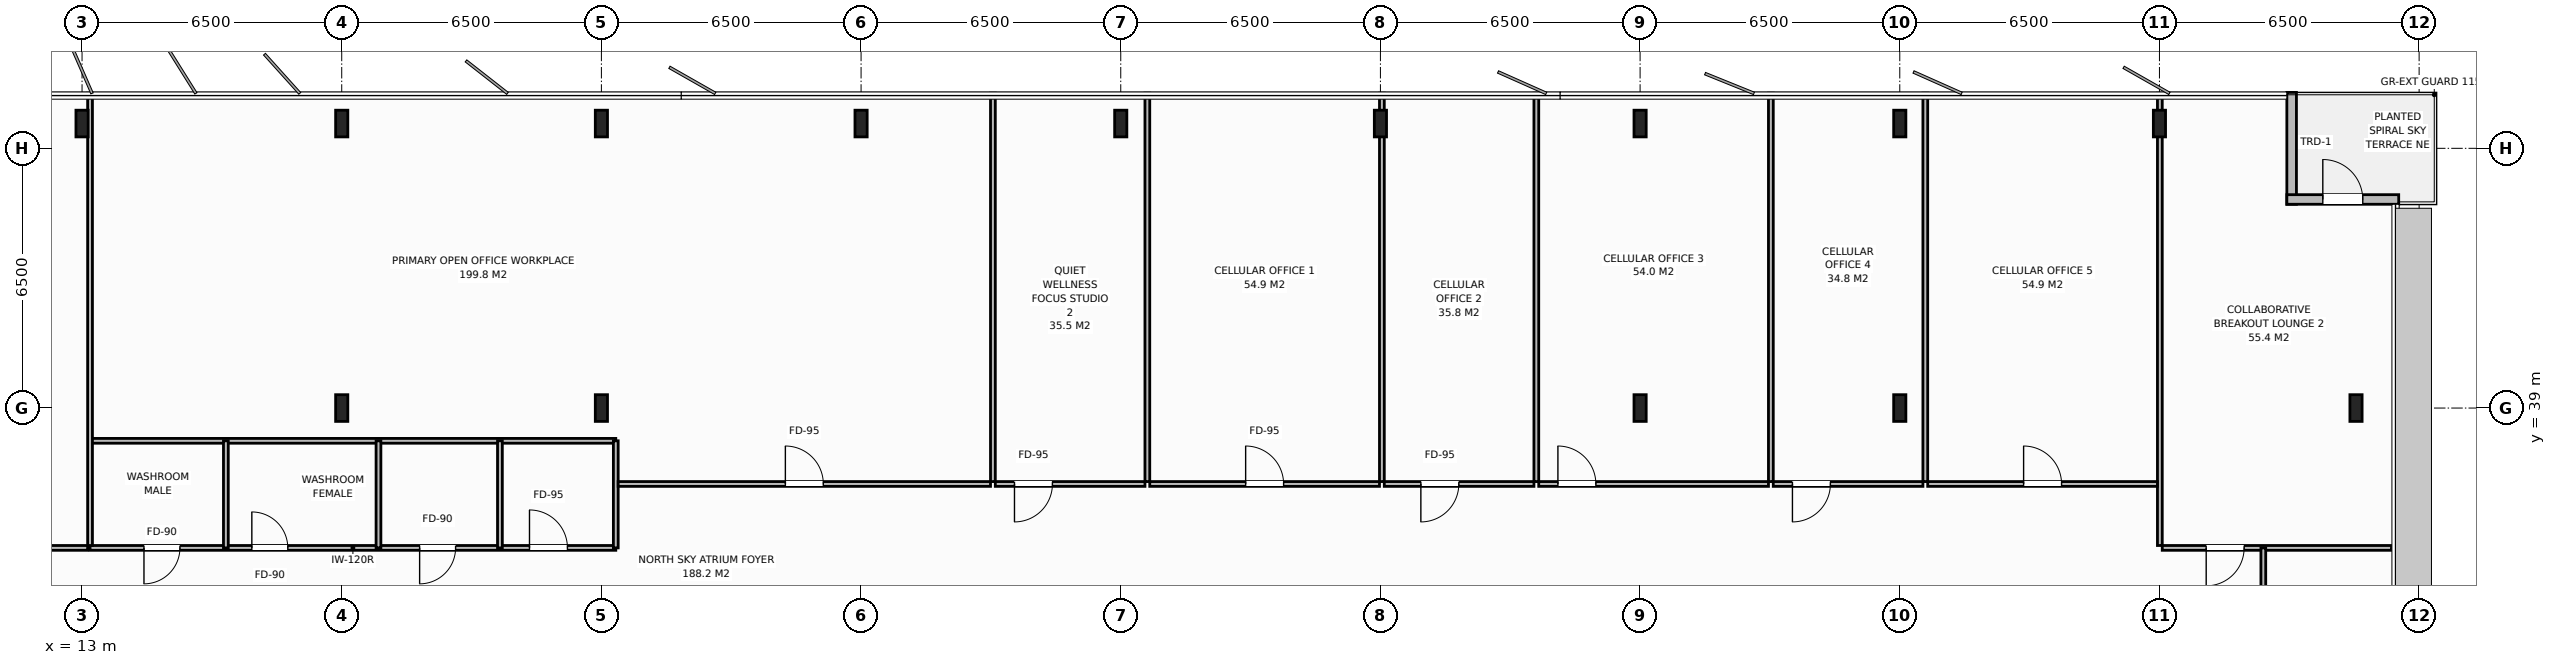
"""IFC4 building model, lengths in metres.
Left out: names, types, materials, properties, quantities, classifications, styles, units other than length and angle.
Written with IfcOpenShell. Run it as: python <this file> out.ifc"""

import sys

from ifc_helpers import new_model, si_unit, direction, frame, frame_2d, origin, origin_2d, place, context, subcontext, project, spatial, rectangle, i_section, extrude, element, fill, save


model = new_model("IFC4")
c1 = context("Model", 3, precision=1e-05, world=origin(), true_north=direction((0.0, 1.0)))
c2 = subcontext(c1, "Body", "Model", "MODEL_VIEW")
j1 = project(units=[si_unit("LENGTHUNIT", "METRE"), si_unit("PLANEANGLEUNIT", "RADIAN")], contexts=[c1])
p1 = place(None, origin())
s1 = spatial("IfcSite", under=j1, at=p1, CompositionType="ELEMENT")
p2 = place(p1, origin())
s2 = spatial("IfcBuilding", under=s1, at=p2, CompositionType="ELEMENT")
p3 = place(p2, frame((0.0, 0.0, 263.2)))
s3 = spatial("IfcBuildingStorey", under=s2, at=p3, CompositionType="ELEMENT", Elevation=263.2)
for number, where, z_axis, x_axis in (
    (1, (19.5, 39.0, 0.0), (0.0, 0.0, 1.0), (1.0, 0.0, 0.0)),
    (2, (58.5, 39.0, 0.0), (0.0, 0.0, 1.0), (1.0, 0.0, 0.0)),
    (3, (26.0, 39.0, 0.0), (0.0, 0.0, 1.0), (1.0, 0.0, 0.0)),
    (4, (52.0, 39.0, 0.0), (0.0, 0.0, 1.0), (1.0, 0.0, 0.0)),
    (5, (13.0, 46.12, 0.0), (0.0, 0.0, 1.0), (1.0, 0.0, 0.0)),
    (6, (19.5, 46.12, 0.0), (0.0, 0.0, 1.0), (1.0, 0.0, 0.0)),
    (7, (26.0, 46.12, 0.0), (0.0, 0.0, 1.0), (1.0, 0.0, 0.0)),
    (8, (32.5, 46.12, 0.0), (0.0, 0.0, 1.0), (1.0, 0.0, 0.0)),
    (9, (39.0, 46.12, 0.0), (0.0, 0.0, 1.0), (1.0, 0.0, 0.0)),
    (10, (45.5, 46.12, 0.0), (0.0, 0.0, 1.0), (1.0, 0.0, 0.0)),
    (11, (52.0, 46.12, 0.0), (0.0, 0.0, 1.0), (1.0, 0.0, 0.0)),
    (12, (58.5, 46.12, 0.0), (0.0, 0.0, 1.0), (1.0, 0.0, 0.0)),
    (13, (65.0, 46.12, 0.0), (0.0, 0.0, 1.0), (1.0, 0.0, 0.0)),
    (14, (69.92, 39.0, 0.0), (0.0, 0.0, 1.0), (1.0, 0.0, 0.0)),
):
    element("IfcColumn", number, at=place(p3, frame(where, z_axis=z_axis, x_axis=x_axis)), inside=s3, PredefinedType="COLUMN", context=c2, shape_type="SweptSolid", body=[
        extrude(i_section(OverallWidth=0.305, OverallDepth=0.668, WebThickness=0.021, FlangeThickness=0.04, at=origin_2d()), origin(), (0.0, 0.0, 1.0), 3.8),
    ])
p4 = place(p3, frame((68.309, 46.9, 0.0), z_axis=(0.0, 0.0, 1.0), x_axis=(0.0, -1.0, 0.0)))
e15 = element("IfcWall", 15, at=p4, inside=s3, PredefinedType="STANDARD", context=c2, shape_type="SweptSolid", body=[
    extrude(rectangle(XDim=2.8, YDim=0.24, at=frame_2d((1.4, 0.0))), origin(), (0.0, 0.0, 1.0), 3.588),
])
p5 = place(p3, frame((68.189, 44.22, 0.0), z_axis=(0.0, 0.0, 1.0), x_axis=(1.0, 0.0, 0.0)))
e16 = element("IfcWall", 16, at=p5, inside=s3, PredefinedType="STANDARD", context=c2, shape_type="SweptSolid", body=[
    extrude(rectangle(XDim=2.8, YDim=0.24, at=frame_2d((1.4, 0.0))), origin(), (0.0, 0.0, 1.0), 3.588),
])
p6 = place(p5, frame((0.9, 0.0, 0.0)))
e17 = element("IfcOpeningElement", 17, at=p6, cuts=e16, PredefinedType="OPENING", context=c2, shape_type="SweptSolid", body=[
    extrude(rectangle(XDim=1.0, YDim=2.2, at=frame_2d((0.5, 1.1))), frame((0.0, 0.13, 0.0), z_axis=(0.0, -1.0, 0.0), x_axis=(1.0, 0.0, 0.0)), (0.0, 0.0, 1.0), 0.26),
])
p7 = place(p3, frame((13.2, 35.5, 0.0), z_axis=(0.0, 0.0, 1.0), x_axis=(1.0, 0.0, 0.0)))
e18 = element("IfcWall", 18, at=p7, inside=s3, PredefinedType="PARTITIONING", context=c2, shape_type="SweptSolid", body=[
    extrude(rectangle(XDim=13.16, YDim=0.12, at=frame_2d((6.58, 0.0))), origin(), (0.0, 0.0, 1.0), 3.588),
])
p8 = place(p7, frame((1.35, 0.0, 0.0)))
e19 = element("IfcOpeningElement", 19, at=p8, cuts=e18, PredefinedType="OPENING", context=c2, shape_type="SweptSolid", body=[
    extrude(rectangle(XDim=0.9, YDim=2.15, at=frame_2d((0.45, 1.075))), frame((0.0, 0.07, 0.0), z_axis=(0.0, -1.0, 0.0), x_axis=(1.0, 0.0, 0.0)), (0.0, 0.0, 1.0), 0.14),
])
p9 = place(p7, frame((4.05, 0.0, 0.0)))
e20 = element("IfcOpeningElement", 20, at=p9, cuts=e18, PredefinedType="OPENING", context=c2, shape_type="SweptSolid", body=[
    extrude(rectangle(XDim=0.9, YDim=2.15, at=frame_2d((0.45, 1.075))), frame((0.0, 0.07, 0.0), z_axis=(0.0, -1.0, 0.0), x_axis=(1.0, 0.0, 0.0)), (0.0, 0.0, 1.0), 0.14),
])
p10 = place(p7, frame((8.25, 0.0, 0.0)))
e21 = element("IfcOpeningElement", 21, at=p10, cuts=e18, PredefinedType="OPENING", context=c2, shape_type="SweptSolid", body=[
    extrude(rectangle(XDim=0.9, YDim=2.15, at=frame_2d((0.45, 1.075))), frame((0.0, 0.07, 0.0), z_axis=(0.0, -1.0, 0.0), x_axis=(1.0, 0.0, 0.0)), (0.0, 0.0, 1.0), 0.14),
])
p11 = place(p7, frame((11.0, 0.0, 0.0)))
e22 = element("IfcOpeningElement", 22, at=p11, cuts=e18, PredefinedType="OPENING", context=c2, shape_type="SweptSolid", body=[
    extrude(rectangle(XDim=0.95, YDim=2.15, at=frame_2d((0.475, 1.075))), frame((0.0, 0.07, 0.0), z_axis=(0.0, -1.0, 0.0), x_axis=(1.0, 0.0, 0.0)), (0.0, 0.0, 1.0), 0.14),
])
p12 = place(p3, frame((13.2, 38.18, 0.0), z_axis=(0.0, 0.0, 1.0), x_axis=(1.0, 0.0, 0.0)))
e23 = element("IfcWall", 23, at=p12, inside=s3, PredefinedType="PARTITIONING", context=c2, shape_type="SweptSolid", body=[
    extrude(rectangle(XDim=13.16, YDim=0.12, at=frame_2d((6.58, 0.0))), origin(), (0.0, 0.0, 1.0), 3.588),
])
for number, where, z_axis, x_axis in (
    (24, (16.6, 35.5, 0.0), (0.0, 0.0, 1.0), (0.0, 1.0, 0.0)),
    (25, (20.42, 35.5, 0.0), (0.0, 0.0, 1.0), (0.0, 1.0, 0.0)),
    (26, (23.46, 35.5, 0.0), (0.0, 0.0, 1.0), (0.0, 1.0, 0.0)),
    (27, (26.36, 35.5, 0.0), (0.0, 0.0, 1.0), (0.0, 1.0, 0.0)),
):
    element("IfcWall", number, at=place(p3, frame(where, z_axis=z_axis, x_axis=x_axis)), inside=s3, PredefinedType="PARTITIONING", context=c2, shape_type="SweptSolid", body=[
        extrude(rectangle(XDim=2.68, YDim=0.12, at=frame_2d((1.34, 0.0))), origin(), (0.0, 0.0, 1.0), 3.588),
    ])
p13 = place(p3, frame((13.2, 35.56, 0.0), z_axis=(0.0, 0.0, 1.0), x_axis=(0.0, 1.0, 0.0)))
e28 = element("IfcWall", 28, at=p13, inside=s3, PredefinedType="PARTITIONING", context=c2, shape_type="SweptSolid", body=[
    extrude(rectangle(XDim=11.32, YDim=0.12, at=frame_2d((5.66, 0.0))), origin(), (0.0, 0.0, 1.0), 2.788),
])
p14 = place(p3, frame((7.38, 35.5, 0.0), z_axis=(0.0, 0.0, 1.0), x_axis=(1.0, 0.0, 0.0)))
e29 = element("IfcWall", 29, at=p14, inside=s3, PredefinedType="PARTITIONING", context=c2, shape_type="SweptSolid", body=[
    extrude(rectangle(XDim=5.76, YDim=0.12, at=frame_2d((2.88, 0.0))), origin(), (0.0, 0.0, 1.0), 3.588),
])
p15 = place(p14, frame((3.5, 0.0, 0.0)))
e30 = element("IfcOpeningElement", 30, at=p15, cuts=e29, PredefinedType="OPENING", context=c2, shape_type="SweptSolid", body=[
    extrude(rectangle(XDim=0.95, YDim=2.15, at=frame_2d((0.475, 1.075))), frame((0.0, 0.07, 0.0), z_axis=(0.0, -1.0, 0.0), x_axis=(1.0, 0.0, 0.0)), (0.0, 0.0, 1.0), 0.14),
])
p16 = place(p3, frame((35.8, 37.16, 0.0), z_axis=(0.0, 0.0, 1.0), x_axis=(0.0, 1.0, 0.0)))
e31 = element("IfcWall", 31, at=p16, inside=s3, PredefinedType="PARTITIONING", context=c2, shape_type="SweptSolid", body=[
    extrude(rectangle(XDim=9.72, YDim=0.12, at=frame_2d((4.86, 0.0))), origin(), (0.0, 0.0, 1.0), 3.588),
])
p17 = place(p3, frame((26.42, 37.1, 0.0), z_axis=(0.0, 0.0, 1.0), x_axis=(1.0, 0.0, 0.0)))
e32 = element("IfcWall", 32, at=p17, inside=s3, PredefinedType="PARTITIONING", context=c2, shape_type="SweptSolid", body=[
    extrude(rectangle(XDim=9.32, YDim=0.12, at=frame_2d((4.66, 0.0))), origin(), (0.0, 0.0, 1.0), 3.588),
])
p18 = place(p17, frame((4.185, 0.0, 0.0)))
e33 = element("IfcOpeningElement", 33, at=p18, cuts=e32, PredefinedType="OPENING", context=c2, shape_type="SweptSolid", body=[
    extrude(rectangle(XDim=0.95, YDim=2.15, at=frame_2d((0.475, 1.075))), frame((0.0, 0.07, 0.0), z_axis=(0.0, -1.0, 0.0), x_axis=(1.0, 0.0, 0.0)), (0.0, 0.0, 1.0), 0.14),
])
p19 = place(p3, frame((39.666, 37.16, 0.0), z_axis=(0.0, 0.0, 1.0), x_axis=(0.0, 1.0, 0.0)))
e34 = element("IfcWall", 34, at=p19, inside=s3, PredefinedType="PARTITIONING", context=c2, shape_type="SweptSolid", body=[
    extrude(rectangle(XDim=9.72, YDim=0.12, at=frame_2d((4.86, 0.0))), origin(), (0.0, 0.0, 1.0), 3.588),
])
p20 = place(p3, frame((35.86, 37.1, 0.0), z_axis=(0.0, 0.0, 1.0), x_axis=(1.0, 0.0, 0.0)))
e35 = element("IfcWall", 35, at=p20, inside=s3, PredefinedType="PARTITIONING", context=c2, shape_type="SweptSolid", body=[
    extrude(rectangle(XDim=3.746, YDim=0.12, at=frame_2d((1.873, 0.0))), origin(), (0.0, 0.0, 1.0), 3.588),
])
p21 = place(p20, frame((0.48, 0.0, 0.0)))
e36 = element("IfcOpeningElement", 36, at=p21, cuts=e35, PredefinedType="OPENING", context=c2, shape_type="SweptSolid", body=[
    extrude(rectangle(XDim=0.95, YDim=2.15, at=frame_2d((0.475, 1.075))), frame((0.0, 0.07, 0.0), z_axis=(0.0, -1.0, 0.0), x_axis=(1.0, 0.0, 0.0)), (0.0, 0.0, 1.0), 0.14),
])
p22 = place(p3, frame((45.537, 37.16, 0.0), z_axis=(0.0, 0.0, 1.0), x_axis=(0.0, 1.0, 0.0)))
e37 = element("IfcWall", 37, at=p22, inside=s3, PredefinedType="PARTITIONING", context=c2, shape_type="SweptSolid", body=[
    extrude(rectangle(XDim=9.72, YDim=0.12, at=frame_2d((4.86, 0.0))), origin(), (0.0, 0.0, 1.0), 2.788),
])
p23 = place(p3, frame((39.726, 37.1, 0.0), z_axis=(0.0, 0.0, 1.0), x_axis=(1.0, 0.0, 0.0)))
e38 = element("IfcWall", 38, at=p23, inside=s3, PredefinedType="PARTITIONING", context=c2, shape_type="SweptSolid", body=[
    extrude(rectangle(XDim=5.751, YDim=0.12, at=frame_2d((2.875, 0.0))), origin(), (0.0, 0.0, 1.0), 3.588),
])
p24 = place(p23, frame((2.4, 0.0, 0.0)))
e39 = element("IfcOpeningElement", 39, at=p24, cuts=e38, PredefinedType="OPENING", context=c2, shape_type="SweptSolid", body=[
    extrude(rectangle(XDim=0.95, YDim=2.15, at=frame_2d((0.475, 1.075))), frame((0.0, 0.07, 0.0), z_axis=(0.0, -1.0, 0.0), x_axis=(1.0, 0.0, 0.0)), (0.0, 0.0, 1.0), 0.14),
])
p25 = place(p3, frame((49.403, 37.16, 0.0), z_axis=(0.0, 0.0, 1.0), x_axis=(0.0, 1.0, 0.0)))
e40 = element("IfcWall", 40, at=p25, inside=s3, PredefinedType="PARTITIONING", context=c2, shape_type="SweptSolid", body=[
    extrude(rectangle(XDim=9.72, YDim=0.12, at=frame_2d((4.86, 0.0))), origin(), (0.0, 0.0, 1.0), 3.588),
])
p26 = place(p3, frame((45.597, 37.1, 0.0), z_axis=(0.0, 0.0, 1.0), x_axis=(1.0, 0.0, 0.0)))
e41 = element("IfcWall", 41, at=p26, inside=s3, PredefinedType="PARTITIONING", context=c2, shape_type="SweptSolid", body=[
    extrude(rectangle(XDim=3.746, YDim=0.12, at=frame_2d((1.873, 0.0))), origin(), (0.0, 0.0, 1.0), 3.588),
])
p27 = place(p26, frame((0.916, 0.0, 0.0)))
e42 = element("IfcOpeningElement", 42, at=p27, cuts=e41, PredefinedType="OPENING", context=c2, shape_type="SweptSolid", body=[
    extrude(rectangle(XDim=0.95, YDim=2.15, at=frame_2d((0.475, 1.075))), frame((0.0, 0.07, 0.0), z_axis=(0.0, -1.0, 0.0), x_axis=(1.0, 0.0, 0.0)), (0.0, 0.0, 1.0), 0.14),
])
p28 = place(p3, frame((55.273, 37.16, 0.0), z_axis=(0.0, 0.0, 1.0), x_axis=(0.0, 1.0, 0.0)))
e43 = element("IfcWall", 43, at=p28, inside=s3, PredefinedType="PARTITIONING", context=c2, shape_type="SweptSolid", body=[
    extrude(rectangle(XDim=9.72, YDim=0.12, at=frame_2d((4.86, 0.0))), origin(), (0.0, 0.0, 1.0), 3.588),
])
p29 = place(p3, frame((49.463, 37.1, 0.0), z_axis=(0.0, 0.0, 1.0), x_axis=(1.0, 0.0, 0.0)))
e44 = element("IfcWall", 44, at=p29, inside=s3, PredefinedType="PARTITIONING", context=c2, shape_type="SweptSolid", body=[
    extrude(rectangle(XDim=5.751, YDim=0.12, at=frame_2d((2.875, 0.0))), origin(), (0.0, 0.0, 1.0), 3.588),
])
p30 = place(p29, frame((0.48, 0.0, 0.0)))
e45 = element("IfcOpeningElement", 45, at=p30, cuts=e44, PredefinedType="OPENING", context=c2, shape_type="SweptSolid", body=[
    extrude(rectangle(XDim=0.95, YDim=2.15, at=frame_2d((0.475, 1.075))), frame((0.0, 0.07, 0.0), z_axis=(0.0, -1.0, 0.0), x_axis=(1.0, 0.0, 0.0)), (0.0, 0.0, 1.0), 0.14),
])
p31 = place(p3, frame((59.139, 37.16, 0.0), z_axis=(0.0, 0.0, 1.0), x_axis=(0.0, 1.0, 0.0)))
e46 = element("IfcWall", 46, at=p31, inside=s3, PredefinedType="PARTITIONING", context=c2, shape_type="SweptSolid", body=[
    extrude(rectangle(XDim=9.72, YDim=0.12, at=frame_2d((4.86, 0.0))), origin(), (0.0, 0.0, 1.0), 3.588),
])
p32 = place(p3, frame((55.333, 37.1, 0.0), z_axis=(0.0, 0.0, 1.0), x_axis=(1.0, 0.0, 0.0)))
e47 = element("IfcWall", 47, at=p32, inside=s3, PredefinedType="PARTITIONING", context=c2, shape_type="SweptSolid", body=[
    extrude(rectangle(XDim=3.746, YDim=0.12, at=frame_2d((1.873, 0.0))), origin(), (0.0, 0.0, 1.0), 3.588),
])
p33 = place(p32, frame((0.48, 0.0, 0.0)))
e48 = element("IfcOpeningElement", 48, at=p33, cuts=e47, PredefinedType="OPENING", context=c2, shape_type="SweptSolid", body=[
    extrude(rectangle(XDim=0.95, YDim=2.15, at=frame_2d((0.475, 1.075))), frame((0.0, 0.07, 0.0), z_axis=(0.0, -1.0, 0.0), x_axis=(1.0, 0.0, 0.0)), (0.0, 0.0, 1.0), 0.14),
])
p34 = place(p3, frame((65.01, 35.56, 0.0), z_axis=(0.0, 0.0, 1.0), x_axis=(0.0, 1.0, 0.0)))
e49 = element("IfcWall", 49, at=p34, inside=s3, PredefinedType="PARTITIONING", context=c2, shape_type="SweptSolid", body=[
    extrude(rectangle(XDim=11.32, YDim=0.12, at=frame_2d((5.66, 0.0))), origin(), (0.0, 0.0, 1.0), 2.788),
])
p35 = place(p3, frame((59.199, 37.1, 0.0), z_axis=(0.0, 0.0, 1.0), x_axis=(1.0, 0.0, 0.0)))
e50 = element("IfcWall", 50, at=p35, inside=s3, PredefinedType="PARTITIONING", context=c2, shape_type="SweptSolid", body=[
    extrude(rectangle(XDim=5.751, YDim=0.12, at=frame_2d((2.875, 0.0))), origin(), (0.0, 0.0, 1.0), 3.588),
])
p36 = place(p35, frame((2.4, 0.0, 0.0)))
e51 = element("IfcOpeningElement", 51, at=p36, cuts=e50, PredefinedType="OPENING", context=c2, shape_type="SweptSolid", body=[
    extrude(rectangle(XDim=0.95, YDim=2.15, at=frame_2d((0.475, 1.075))), frame((0.0, 0.07, 0.0), z_axis=(0.0, -1.0, 0.0), x_axis=(1.0, 0.0, 0.0)), (0.0, 0.0, 1.0), 0.14),
])
p37 = place(p3, frame((65.07, 35.5, 0.0), z_axis=(0.0, 0.0, 1.0), x_axis=(1.0, 0.0, 0.0)))
e52 = element("IfcWall", 52, at=p37, inside=s3, PredefinedType="PARTITIONING", context=c2, shape_type="SweptSolid", body=[
    extrude(rectangle(XDim=5.739, YDim=0.12, at=frame_2d((2.87, 0.0))), origin(), (0.0, 0.0, 1.0), 3.588),
])
p38 = place(p37, frame((1.1, 0.0, 0.0)))
e53 = element("IfcOpeningElement", 53, at=p38, cuts=e52, PredefinedType="OPENING", context=c2, shape_type="SweptSolid", body=[
    extrude(rectangle(XDim=0.95, YDim=2.15, at=frame_2d((0.475, 1.075))), frame((0.0, 0.07, 0.0), z_axis=(0.0, -1.0, 0.0), x_axis=(1.0, 0.0, 0.0)), (0.0, 0.0, 1.0), 0.14),
])
p39 = place(p3, frame((67.6, 16.5, 0.0), z_axis=(0.0, 0.0, 1.0), x_axis=(0.0, 1.0, 0.0)))
e54 = element("IfcWall", 54, at=p39, inside=s3, PredefinedType="PARTITIONING", context=c2, shape_type="SweptSolid", body=[
    extrude(rectangle(XDim=19.0, YDim=0.12, at=frame_2d((9.5, 0.0))), origin(), (0.0, 0.0, 1.0), 3.588),
])
p40 = place(p39, frame((9.025, 0.0, 0.0)))
e55 = element("IfcOpeningElement", 55, at=p40, cuts=e54, PredefinedType="OPENING", context=c2, shape_type="SweptSolid", body=[
    extrude(rectangle(XDim=0.95, YDim=2.15, at=frame_2d((0.475, 1.075))), frame((0.0, 0.07, 0.0), z_axis=(0.0, -1.0, 0.0), x_axis=(1.0, 0.0, 0.0)), (0.0, 0.0, 1.0), 0.14),
])
p41 = place(p6, origin())
e56 = element("IfcDoor", 56, at=p41, inside=s3, OperationType="SINGLE_SWING_LEFT", PredefinedType="DOOR", context=c2, shape_type="SweptSolid", body=[
    extrude(rectangle(XDim=1.0, YDim=2.2, at=frame_2d((0.5, 1.1))), frame((0.0, 0.025, 0.0), z_axis=(0.0, -1.0, 0.0), x_axis=(1.0, 0.0, 0.0)), (0.0, 0.0, 1.0), 0.05),
])
fill(e17, e56)
p42 = place(p8, origin())
e57 = element("IfcDoor", 57, at=p42, inside=s3, OperationType="SINGLE_SWING_RIGHT", PredefinedType="DOOR", context=c2, shape_type="SweptSolid", body=[
    extrude(rectangle(XDim=0.9, YDim=2.15, at=frame_2d((0.45, 1.075))), frame((0.0, 0.025, 0.0), z_axis=(0.0, -1.0, 0.0), x_axis=(1.0, 0.0, 0.0)), (0.0, 0.0, 1.0), 0.05),
])
fill(e19, e57)
p43 = place(p9, origin())
e58 = element("IfcDoor", 58, at=p43, inside=s3, OperationType="SINGLE_SWING_LEFT", PredefinedType="DOOR", context=c2, shape_type="SweptSolid", body=[
    extrude(rectangle(XDim=0.9, YDim=2.15, at=frame_2d((0.45, 1.075))), frame((0.0, 0.025, 0.0), z_axis=(0.0, -1.0, 0.0), x_axis=(1.0, 0.0, 0.0)), (0.0, 0.0, 1.0), 0.05),
])
fill(e20, e58)
p44 = place(p10, origin())
e59 = element("IfcDoor", 59, at=p44, inside=s3, OperationType="SINGLE_SWING_RIGHT", PredefinedType="DOOR", context=c2, shape_type="SweptSolid", body=[
    extrude(rectangle(XDim=0.9, YDim=2.15, at=frame_2d((0.45, 1.075))), frame((0.0, 0.025, 0.0), z_axis=(0.0, -1.0, 0.0), x_axis=(1.0, 0.0, 0.0)), (0.0, 0.0, 1.0), 0.05),
])
fill(e21, e59)
p45 = place(p11, origin())
e60 = element("IfcDoor", 60, at=p45, inside=s3, OperationType="SINGLE_SWING_LEFT", PredefinedType="DOOR", context=c2, shape_type="SweptSolid", body=[
    extrude(rectangle(XDim=0.95, YDim=2.15, at=frame_2d((0.475, 1.075))), frame((0.0, 0.025, 0.0), z_axis=(0.0, -1.0, 0.0), x_axis=(1.0, 0.0, 0.0)), (0.0, 0.0, 1.0), 0.05),
])
fill(e22, e60)
p46 = place(p18, origin())
e61 = element("IfcDoor", 61, at=p46, inside=s3, OperationType="SINGLE_SWING_LEFT", PredefinedType="DOOR", context=c2, shape_type="SweptSolid", body=[
    extrude(rectangle(XDim=0.95, YDim=2.15, at=frame_2d((0.475, 1.075))), frame((0.0, 0.025, 0.0), z_axis=(0.0, -1.0, 0.0), x_axis=(1.0, 0.0, 0.0)), (0.0, 0.0, 1.0), 0.05),
])
fill(e33, e61)
p47 = place(p21, origin())
e62 = element("IfcDoor", 62, at=p47, inside=s3, OperationType="SINGLE_SWING_RIGHT", PredefinedType="DOOR", context=c2, shape_type="SweptSolid", body=[
    extrude(rectangle(XDim=0.95, YDim=2.15, at=frame_2d((0.475, 1.075))), frame((0.0, 0.025, 0.0), z_axis=(0.0, -1.0, 0.0), x_axis=(1.0, 0.0, 0.0)), (0.0, 0.0, 1.0), 0.05),
])
fill(e36, e62)
p48 = place(p24, origin())
e63 = element("IfcDoor", 63, at=p48, inside=s3, OperationType="SINGLE_SWING_LEFT", PredefinedType="DOOR", context=c2, shape_type="SweptSolid", body=[
    extrude(rectangle(XDim=0.95, YDim=2.15, at=frame_2d((0.475, 1.075))), frame((0.0, 0.025, 0.0), z_axis=(0.0, -1.0, 0.0), x_axis=(1.0, 0.0, 0.0)), (0.0, 0.0, 1.0), 0.05),
])
fill(e39, e63)
p49 = place(p27, origin())
e64 = element("IfcDoor", 64, at=p49, inside=s3, OperationType="SINGLE_SWING_RIGHT", PredefinedType="DOOR", context=c2, shape_type="SweptSolid", body=[
    extrude(rectangle(XDim=0.95, YDim=2.15, at=frame_2d((0.475, 1.075))), frame((0.0, 0.025, 0.0), z_axis=(0.0, -1.0, 0.0), x_axis=(1.0, 0.0, 0.0)), (0.0, 0.0, 1.0), 0.05),
])
fill(e42, e64)
p50 = place(p30, origin())
e65 = element("IfcDoor", 65, at=p50, inside=s3, OperationType="SINGLE_SWING_LEFT", PredefinedType="DOOR", context=c2, shape_type="SweptSolid", body=[
    extrude(rectangle(XDim=0.95, YDim=2.15, at=frame_2d((0.475, 1.075))), frame((0.0, 0.025, 0.0), z_axis=(0.0, -1.0, 0.0), x_axis=(1.0, 0.0, 0.0)), (0.0, 0.0, 1.0), 0.05),
])
fill(e45, e65)
p51 = place(p33, origin())
e66 = element("IfcDoor", 66, at=p51, inside=s3, OperationType="SINGLE_SWING_RIGHT", PredefinedType="DOOR", context=c2, shape_type="SweptSolid", body=[
    extrude(rectangle(XDim=0.95, YDim=2.15, at=frame_2d((0.475, 1.075))), frame((0.0, 0.025, 0.0), z_axis=(0.0, -1.0, 0.0), x_axis=(1.0, 0.0, 0.0)), (0.0, 0.0, 1.0), 0.05),
])
fill(e48, e66)
p52 = place(p36, origin())
e67 = element("IfcDoor", 67, at=p52, inside=s3, OperationType="SINGLE_SWING_LEFT", PredefinedType="DOOR", context=c2, shape_type="SweptSolid", body=[
    extrude(rectangle(XDim=0.95, YDim=2.15, at=frame_2d((0.475, 1.075))), frame((0.0, 0.025, 0.0), z_axis=(0.0, -1.0, 0.0), x_axis=(1.0, 0.0, 0.0)), (0.0, 0.0, 1.0), 0.05),
])
fill(e51, e67)
p53 = place(p38, origin())
e68 = element("IfcDoor", 68, at=p53, inside=s3, OperationType="SINGLE_SWING_RIGHT", PredefinedType="DOOR", context=c2, shape_type="SweptSolid", body=[
    extrude(rectangle(XDim=0.95, YDim=2.15, at=frame_2d((0.475, 1.075))), frame((0.0, 0.025, 0.0), z_axis=(0.0, -1.0, 0.0), x_axis=(1.0, 0.0, 0.0)), (0.0, 0.0, 1.0), 0.05),
])
fill(e53, e68)
save(model, sys.argv[1])
